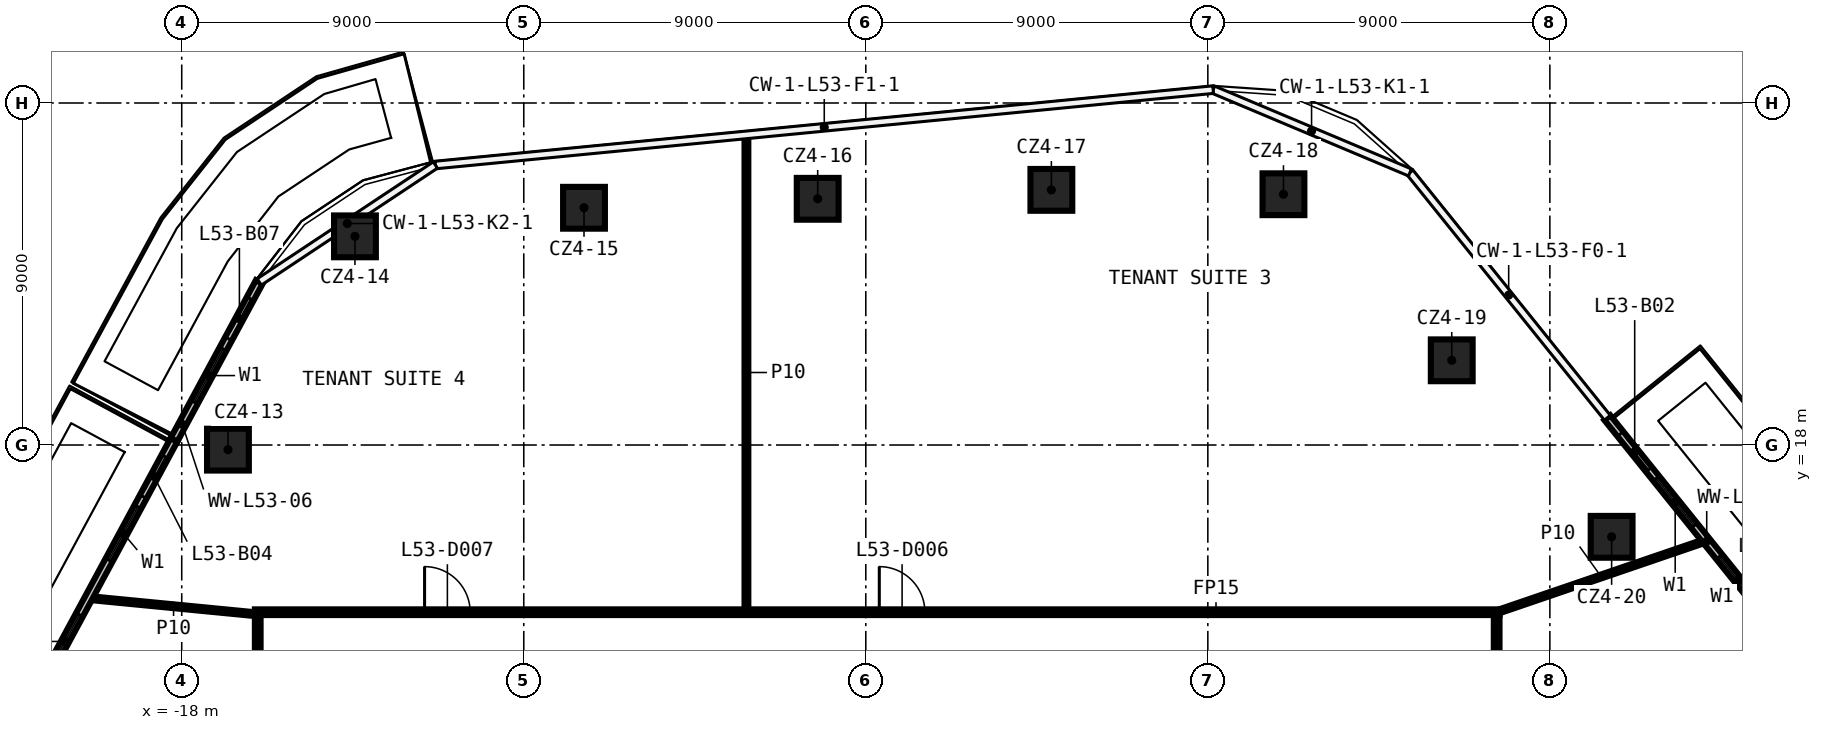
"""IFC4 building model, lengths in metres.
Left out: names, types, materials, properties, quantities, classifications, styles, units other than length and angle.
Written with IfcOpenShell. Run it as: python <this file> out.ifc"""

import sys

from ifc_helpers import new_model, si_unit, direction, frame, frame_2d, origin, origin_2d, place, context, subcontext, project, spatial, rectangle, extrude, element, fill, save


model = new_model("IFC4")
c1 = context("Model", 3, precision=1e-05, world=origin(), true_north=direction((0.0, 1.0)))
c2 = subcontext(c1, "Body", "Model", "MODEL_VIEW")
j1 = project(units=[si_unit("LENGTHUNIT", "METRE"), si_unit("PLANEANGLEUNIT", "RADIAN")], contexts=[c1])
p1 = place(None, origin())
s1 = spatial("IfcSite", under=j1, at=p1, CompositionType="ELEMENT")
p2 = place(p1, origin())
s2 = spatial("IfcBuilding", under=s1, at=p2, CompositionType="ELEMENT")
p3 = place(p2, frame((0.0, 0.0, 253.8)))
s3 = spatial("IfcBuildingStorey", under=s2, at=p3, CompositionType="ELEMENT", Elevation=253.8)
for number, where, z_axis, x_axis in (
    (1, (-16.784, 17.878, 0.0), (0.0, 0.0, 1.0), (1.0, 0.0, 0.0)),
    (2, (-13.442, 23.491, 0.0), (0.0, 0.0, 1.0), (1.0, 0.0, 0.0)),
    (3, (-7.415, 24.243, 0.0), (0.0, 0.0, 1.0), (1.0, 0.0, 0.0)),
    (4, (-1.266, 24.479, 0.0), (0.0, 0.0, 1.0), (1.0, 0.0, 0.0)),
    (5, (4.883, 24.714, 0.0), (0.0, 0.0, 1.0), (1.0, 0.0, 0.0)),
    (6, (10.99, 24.599, 0.0), (0.0, 0.0, 1.0), (1.0, 0.0, 0.0)),
    (7, (15.418, 20.229, 0.0), (0.0, 0.0, 1.0), (1.0, 0.0, 0.0)),
    (8, (19.625, 15.584, 0.0), (0.0, 0.0, 1.0), (1.0, 0.0, 0.0)),
):
    element("IfcColumn", number, at=place(p3, frame(where, z_axis=z_axis, x_axis=x_axis)), inside=s3, PredefinedType="COLUMN", context=c2, shape_type="SweptSolid", body=[
        extrude(rectangle(XDim=1.1, YDim=1.1, at=origin_2d()), origin(), (0.0, 0.0, 1.0), 3.82),
    ])
p4 = place(p3, frame((-16.075, 13.6, 0.0), z_axis=(0.0, 0.0, 1.0), x_axis=(1.0, 0.0, 0.0)))
e9 = element("IfcWall", 9, at=p4, inside=s3, PredefinedType="PARTITIONING", context=c2, shape_type="SweptSolid", body=[
    extrude(rectangle(XDim=32.75, YDim=0.15, at=frame_2d((16.375, 0.0))), origin(), (0.0, 0.0, 1.0), 3.82),
])
p5 = place(p4, frame((16.43, 0.0, 0.0)))
e10 = element("IfcOpeningElement", 10, at=p5, cuts=e9, PredefinedType="OPENING", context=c2, shape_type="SweptSolid", body=[
    extrude(rectangle(XDim=1.2, YDim=2.1, at=frame_2d((0.6, 1.05))), frame((0.0, 0.085, 0.0), z_axis=(0.0, -1.0, 0.0), x_axis=(1.0, 0.0, 0.0)), (0.0, 0.0, 1.0), 0.17),
])
p6 = place(p4, frame((4.465, 0.0, 0.0)))
e11 = element("IfcOpeningElement", 11, at=p6, cuts=e9, PredefinedType="OPENING", context=c2, shape_type="SweptSolid", body=[
    extrude(rectangle(XDim=1.2, YDim=2.1, at=frame_2d((0.6, 1.05))), frame((0.0, 0.085, 0.0), z_axis=(0.0, -1.0, 0.0), x_axis=(1.0, 0.0, 0.0)), (0.0, 0.0, 1.0), 0.17),
])
p7 = place(p3, frame((16.6, 13.6, 0.0), z_axis=(0.0, 0.0, 1.0), x_axis=(0.946142628781, 0.323750098073, 0.0)))
e12 = element("IfcWall", 12, at=p7, inside=s3, PredefinedType="PARTITIONING", context=c2, shape_type="SweptSolid", body=[
    extrude(rectangle(XDim=5.805, YDim=0.1, at=frame_2d((2.903, 0.0))), origin(), (0.0, 0.0, 1.0), 3.82),
])
p8 = place(p3, frame((16.6, 13.525, 0.0), z_axis=(0.0, 0.0, 1.0), x_axis=(0.0, -1.0, 0.0)))
e13 = element("IfcWall", 13, at=p8, inside=s3, PredefinedType="PARTITIONING", context=c2, shape_type="SweptSolid", body=[
    extrude(rectangle(XDim=27.05, YDim=0.15, at=frame_2d((13.525, 0.0))), origin(), (0.0, 0.0, 1.0), 3.82),
])
p9 = place(p8, frame((22.559, 0.0, 0.0)))
e14 = element("IfcOpeningElement", 14, at=p9, cuts=e13, PredefinedType="OPENING", context=c2, shape_type="SweptSolid", body=[
    extrude(rectangle(XDim=1.2, YDim=2.1, at=frame_2d((0.6, 1.05))), frame((0.0, 0.085, 0.0), z_axis=(0.0, -1.0, 0.0), x_axis=(1.0, 0.0, 0.0)), (0.0, 0.0, 1.0), 0.17),
])
p10 = place(p8, frame((11.036, 0.0, 0.0)))
e15 = element("IfcOpeningElement", 15, at=p10, cuts=e13, PredefinedType="OPENING", context=c2, shape_type="SweptSolid", body=[
    extrude(rectangle(XDim=1.2, YDim=2.1, at=frame_2d((0.6, 1.05))), frame((0.0, 0.085, 0.0), z_axis=(0.0, -1.0, 0.0), x_axis=(1.0, 0.0, 0.0)), (0.0, 0.0, 1.0), 0.17),
])
p11 = place(p3, frame((-3.141, 13.675, 0.0), z_axis=(0.0, 0.0, 1.0), x_axis=(0.0, 1.0, 0.0)))
e16 = element("IfcWall", 16, at=p11, inside=s3, PredefinedType="PARTITIONING", context=c2, shape_type="SweptSolid", body=[
    extrude(rectangle(XDim=12.466, YDim=0.1, at=frame_2d((6.233, 0.0))), origin(), (0.0, 0.0, 1.0), 3.82),
])
p12 = place(p3, frame((-16.0, 11.074, 0.0), z_axis=(0.0, 0.0, 1.0), x_axis=(0.0, 1.0, 0.0)))
e17 = element("IfcWall", 17, at=p12, inside=s3, PredefinedType="PARTITIONING", context=c2, shape_type="SweptSolid", body=[
    extrude(rectangle(XDim=2.451, YDim=0.15, at=frame_2d((1.226, 0.0))), origin(), (0.0, 0.0, 1.0), 3.82),
])
p13 = place(p3, frame((-20.43, 13.972, 0.0), z_axis=(0.0, 0.0, 1.0), x_axis=(0.995312443594, -0.096711631286, 0.0)))
e18 = element("IfcWall", 18, at=p13, inside=s3, PredefinedType="PARTITIONING", context=c2, shape_type="SweptSolid", body=[
    extrude(rectangle(XDim=4.45, YDim=0.1, at=frame_2d((2.225, 0.0))), origin(), (0.0, 0.0, 1.0), 3.82),
])
p14 = place(p3, frame((24.712, 12.255, 0.0), z_axis=(0.0, 0.0, 1.0), x_axis=(-0.626871708653, 0.77912249415, 0.0)))
e19 = element("IfcWall", 19, at=p14, inside=s3, PredefinedType="SOLIDWALL", context=c2, shape_type="SweptSolid", body=[
    extrude(rectangle(XDim=8.293, YDim=0.2, at=frame_2d((4.147, 0.0))), origin(), (0.0, 0.0, 1.0), 3.82),
])
p15 = place(p14, frame((2.0, 0.0, 0.6)))
e20 = element("IfcOpeningElement", 20, at=p15, cuts=e19, PredefinedType="OPENING", context=c2, shape_type="SweptSolid", body=[
    extrude(rectangle(XDim=1.6, YDim=2.4, at=frame_2d((0.8, 1.2))), frame((0.0, 0.11, 0.0), z_axis=(0.0, -1.0, 0.0), x_axis=(1.0, 0.0, 0.0)), (0.0, 0.0, 1.0), 0.22),
])
p16 = place(p14, frame((0.5, 0.0, 0.0)))
e21 = element("IfcOpeningElement", 21, at=p16, cuts=e19, PredefinedType="OPENING", context=c2, shape_type="SweptSolid", body=[
    extrude(rectangle(XDim=1.2, YDim=2.4, at=frame_2d((0.6, 1.2))), frame((0.0, 0.11, 0.0), z_axis=(0.0, -1.0, 0.0), x_axis=(1.0, 0.0, 0.0)), (0.0, 0.0, 1.0), 0.22),
])
p17 = place(p14, frame((4.647, 0.0, 0.6)))
e22 = element("IfcOpeningElement", 22, at=p17, cuts=e19, PredefinedType="OPENING", context=c2, shape_type="SweptSolid", body=[
    extrude(rectangle(XDim=1.6, YDim=2.4, at=frame_2d((0.8, 1.2))), frame((0.0, 0.11, 0.0), z_axis=(0.0, -1.0, 0.0), x_axis=(1.0, 0.0, 0.0)), (0.0, 0.0, 1.0), 0.22),
])
p18 = place(p14, frame((6.547, 0.0, 0.0)))
e23 = element("IfcOpeningElement", 23, at=p18, cuts=e19, PredefinedType="OPENING", context=c2, shape_type="SweptSolid", body=[
    extrude(rectangle(XDim=1.2, YDim=2.4, at=frame_2d((0.6, 1.2))), frame((0.0, 0.11, 0.0), z_axis=(0.0, -1.0, 0.0), x_axis=(1.0, 0.0, 0.0)), (0.0, 0.0, 1.0), 0.22),
])
p19 = place(p3, frame((-18.204, 18.136, 0.0), z_axis=(0.0, 0.0, 1.0), x_axis=(-0.475207525375, -0.87987374539, 0.0)))
e24 = element("IfcWall", 24, at=p19, inside=s3, PredefinedType="SOLIDWALL", context=c2, shape_type="SweptSolid", body=[
    extrude(rectangle(XDim=14.19, YDim=0.2, at=frame_2d((7.095, 0.0))), origin(), (0.0, 0.0, 1.0), 3.82),
])
p20 = place(p19, frame((2.0, 0.0, 0.6)))
e25 = element("IfcOpeningElement", 25, at=p20, cuts=e24, PredefinedType="OPENING", context=c2, shape_type="SweptSolid", body=[
    extrude(rectangle(XDim=1.6, YDim=2.4, at=frame_2d((0.8, 1.2))), frame((0.0, 0.11, 0.0), z_axis=(0.0, -1.0, 0.0), x_axis=(1.0, 0.0, 0.0)), (0.0, 0.0, 1.0), 0.22),
])
p21 = place(p19, frame((0.5, 0.0, 0.0)))
e26 = element("IfcOpeningElement", 26, at=p21, cuts=e24, PredefinedType="OPENING", context=c2, shape_type="SweptSolid", body=[
    extrude(rectangle(XDim=1.2, YDim=2.4, at=frame_2d((0.6, 1.2))), frame((0.0, 0.11, 0.0), z_axis=(0.0, -1.0, 0.0), x_axis=(1.0, 0.0, 0.0)), (0.0, 0.0, 1.0), 0.22),
])
p22 = place(p19, frame((5.23, 0.0, 0.6)))
e27 = element("IfcOpeningElement", 27, at=p22, cuts=e24, PredefinedType="OPENING", context=c2, shape_type="SweptSolid", body=[
    extrude(rectangle(XDim=1.6, YDim=2.4, at=frame_2d((0.8, 1.2))), frame((0.0, 0.11, 0.0), z_axis=(0.0, -1.0, 0.0), x_axis=(1.0, 0.0, 0.0)), (0.0, 0.0, 1.0), 0.22),
])
p23 = place(p19, frame((7.13, 0.0, 0.0)))
e28 = element("IfcOpeningElement", 28, at=p23, cuts=e24, PredefinedType="OPENING", context=c2, shape_type="SweptSolid", body=[
    extrude(rectangle(XDim=1.2, YDim=2.4, at=frame_2d((0.6, 1.2))), frame((0.0, 0.11, 0.0), z_axis=(0.0, -1.0, 0.0), x_axis=(1.0, 0.0, 0.0)), (0.0, 0.0, 1.0), 0.22),
])
p24 = place(p19, frame((11.46, 0.0, 0.6)))
e29 = element("IfcOpeningElement", 29, at=p24, cuts=e24, PredefinedType="OPENING", context=c2, shape_type="SweptSolid", body=[
    extrude(rectangle(XDim=1.6, YDim=2.4, at=frame_2d((0.8, 1.2))), frame((0.0, 0.11, 0.0), z_axis=(0.0, -1.0, 0.0), x_axis=(1.0, 0.0, 0.0)), (0.0, 0.0, 1.0), 0.22),
])
p25 = place(p19, frame((9.96, 0.0, 0.0)))
e30 = element("IfcOpeningElement", 30, at=p25, cuts=e24, PredefinedType="OPENING", context=c2, shape_type="SweptSolid", body=[
    extrude(rectangle(XDim=1.2, YDim=2.4, at=frame_2d((0.6, 1.2))), frame((0.0, 0.11, 0.0), z_axis=(0.0, -1.0, 0.0), x_axis=(1.0, 0.0, 0.0)), (0.0, 0.0, 1.0), 0.22),
])
p26 = place(p3, frame((-15.96, 22.291, 0.0), z_axis=(0.0, 0.0, 1.0), x_axis=(-0.47520015235, -0.879877727418, 0.0)))
e31 = element("IfcWall", 31, at=p26, inside=s3, PredefinedType="SOLIDWALL", context=c2, shape_type="SweptSolid", body=[
    extrude(rectangle(XDim=4.722, YDim=0.2, at=frame_2d((2.361, 0.0))), origin(), (0.0, 0.0, 1.0), 3.82),
])
p27 = place(p26, frame((2.0, 0.0, 0.6)))
e32 = element("IfcOpeningElement", 32, at=p27, cuts=e31, PredefinedType="OPENING", context=c2, shape_type="SweptSolid", body=[
    extrude(rectangle(XDim=1.6, YDim=2.4, at=frame_2d((0.8, 1.2))), frame((0.0, 0.11, 0.0), z_axis=(0.0, -1.0, 0.0), x_axis=(1.0, 0.0, 0.0)), (0.0, 0.0, 1.0), 0.22),
])
p28 = place(p26, frame((0.5, 0.0, 0.0)))
e33 = element("IfcOpeningElement", 33, at=p28, cuts=e31, PredefinedType="OPENING", context=c2, shape_type="SweptSolid", body=[
    extrude(rectangle(XDim=1.2, YDim=2.4, at=frame_2d((0.6, 1.2))), frame((0.0, 0.11, 0.0), z_axis=(0.0, -1.0, 0.0), x_axis=(1.0, 0.0, 0.0)), (0.0, 0.0, 1.0), 0.22),
])
p29 = place(p5, origin())
e34 = element("IfcDoor", 34, at=p29, inside=s3, OperationType="SINGLE_SWING_LEFT", PredefinedType="DOOR", context=c2, shape_type="SweptSolid", body=[
    extrude(rectangle(XDim=1.2, YDim=2.1, at=frame_2d((0.6, 1.05))), frame((0.0, 0.025, 0.0), z_axis=(0.0, -1.0, 0.0), x_axis=(1.0, 0.0, 0.0)), (0.0, 0.0, 1.0), 0.05),
])
fill(e10, e34)
p30 = place(p6, origin())
e35 = element("IfcDoor", 35, at=p30, inside=s3, OperationType="SINGLE_SWING_RIGHT", PredefinedType="DOOR", context=c2, shape_type="SweptSolid", body=[
    extrude(rectangle(XDim=1.2, YDim=2.1, at=frame_2d((0.6, 1.05))), frame((0.0, 0.025, 0.0), z_axis=(0.0, -1.0, 0.0), x_axis=(1.0, 0.0, 0.0)), (0.0, 0.0, 1.0), 0.05),
])
fill(e11, e35)
p31 = place(p15, origin())
e36 = element("IfcWindow", 36, at=p31, inside=s3, PartitioningType="SINGLE_PANEL", PredefinedType="WINDOW", context=c2, shape_type="SweptSolid", body=[
    extrude(rectangle(XDim=1.6, YDim=2.4, at=frame_2d((0.8, 1.2))), frame((0.0, 0.03, 0.0), z_axis=(0.0, -1.0, 0.0), x_axis=(1.0, 0.0, 0.0)), (0.0, 0.0, 1.0), 0.06),
])
fill(e20, e36)
p32 = place(p17, origin())
e37 = element("IfcWindow", 37, at=p32, inside=s3, PartitioningType="SINGLE_PANEL", PredefinedType="WINDOW", context=c2, shape_type="SweptSolid", body=[
    extrude(rectangle(XDim=1.6, YDim=2.4, at=frame_2d((0.8, 1.2))), frame((0.0, 0.03, 0.0), z_axis=(0.0, -1.0, 0.0), x_axis=(1.0, 0.0, 0.0)), (0.0, 0.0, 1.0), 0.06),
])
fill(e22, e37)
p33 = place(p18, origin())
e38 = element("IfcDoor", 38, at=p33, inside=s3, OperationType="SLIDING_TO_LEFT", PredefinedType="DOOR", context=c2, shape_type="SweptSolid", body=[
    extrude(rectangle(XDim=1.2, YDim=2.4, at=frame_2d((0.6, 1.2))), frame((0.0, 0.025, 0.0), z_axis=(0.0, -1.0, 0.0), x_axis=(1.0, 0.0, 0.0)), (0.0, 0.0, 1.0), 0.05),
])
fill(e23, e38)
p34 = place(p20, origin())
e39 = element("IfcWindow", 39, at=p34, inside=s3, PartitioningType="SINGLE_PANEL", PredefinedType="WINDOW", context=c2, shape_type="SweptSolid", body=[
    extrude(rectangle(XDim=1.6, YDim=2.4, at=frame_2d((0.8, 1.2))), frame((0.0, 0.03, 0.0), z_axis=(0.0, -1.0, 0.0), x_axis=(1.0, 0.0, 0.0)), (0.0, 0.0, 1.0), 0.06),
])
fill(e25, e39)
p35 = place(p21, origin())
e40 = element("IfcDoor", 40, at=p35, inside=s3, OperationType="SLIDING_TO_LEFT", PredefinedType="DOOR", context=c2, shape_type="SweptSolid", body=[
    extrude(rectangle(XDim=1.2, YDim=2.4, at=frame_2d((0.6, 1.2))), frame((0.0, 0.025, 0.0), z_axis=(0.0, -1.0, 0.0), x_axis=(1.0, 0.0, 0.0)), (0.0, 0.0, 1.0), 0.05),
])
fill(e26, e40)
p36 = place(p22, origin())
e41 = element("IfcWindow", 41, at=p36, inside=s3, PartitioningType="SINGLE_PANEL", PredefinedType="WINDOW", context=c2, shape_type="SweptSolid", body=[
    extrude(rectangle(XDim=1.6, YDim=2.4, at=frame_2d((0.8, 1.2))), frame((0.0, 0.03, 0.0), z_axis=(0.0, -1.0, 0.0), x_axis=(1.0, 0.0, 0.0)), (0.0, 0.0, 1.0), 0.06),
])
fill(e27, e41)
p37 = place(p27, origin())
e42 = element("IfcWindow", 42, at=p37, inside=s3, PartitioningType="SINGLE_PANEL", PredefinedType="WINDOW", context=c2, shape_type="SweptSolid", body=[
    extrude(rectangle(XDim=1.6, YDim=2.4, at=frame_2d((0.8, 1.2))), frame((0.0, 0.03, 0.0), z_axis=(0.0, -1.0, 0.0), x_axis=(1.0, 0.0, 0.0)), (0.0, 0.0, 1.0), 0.06),
])
fill(e32, e42)
p38 = place(p28, origin())
e43 = element("IfcDoor", 43, at=p38, inside=s3, OperationType="SLIDING_TO_LEFT", PredefinedType="DOOR", context=c2, shape_type="SweptSolid", body=[
    extrude(rectangle(XDim=1.2, YDim=2.4, at=frame_2d((0.6, 1.2))), frame((0.0, 0.025, 0.0), z_axis=(0.0, -1.0, 0.0), x_axis=(1.0, 0.0, 0.0)), (0.0, 0.0, 1.0), 0.05),
])
fill(e33, e43)
save(model, sys.argv[1])
